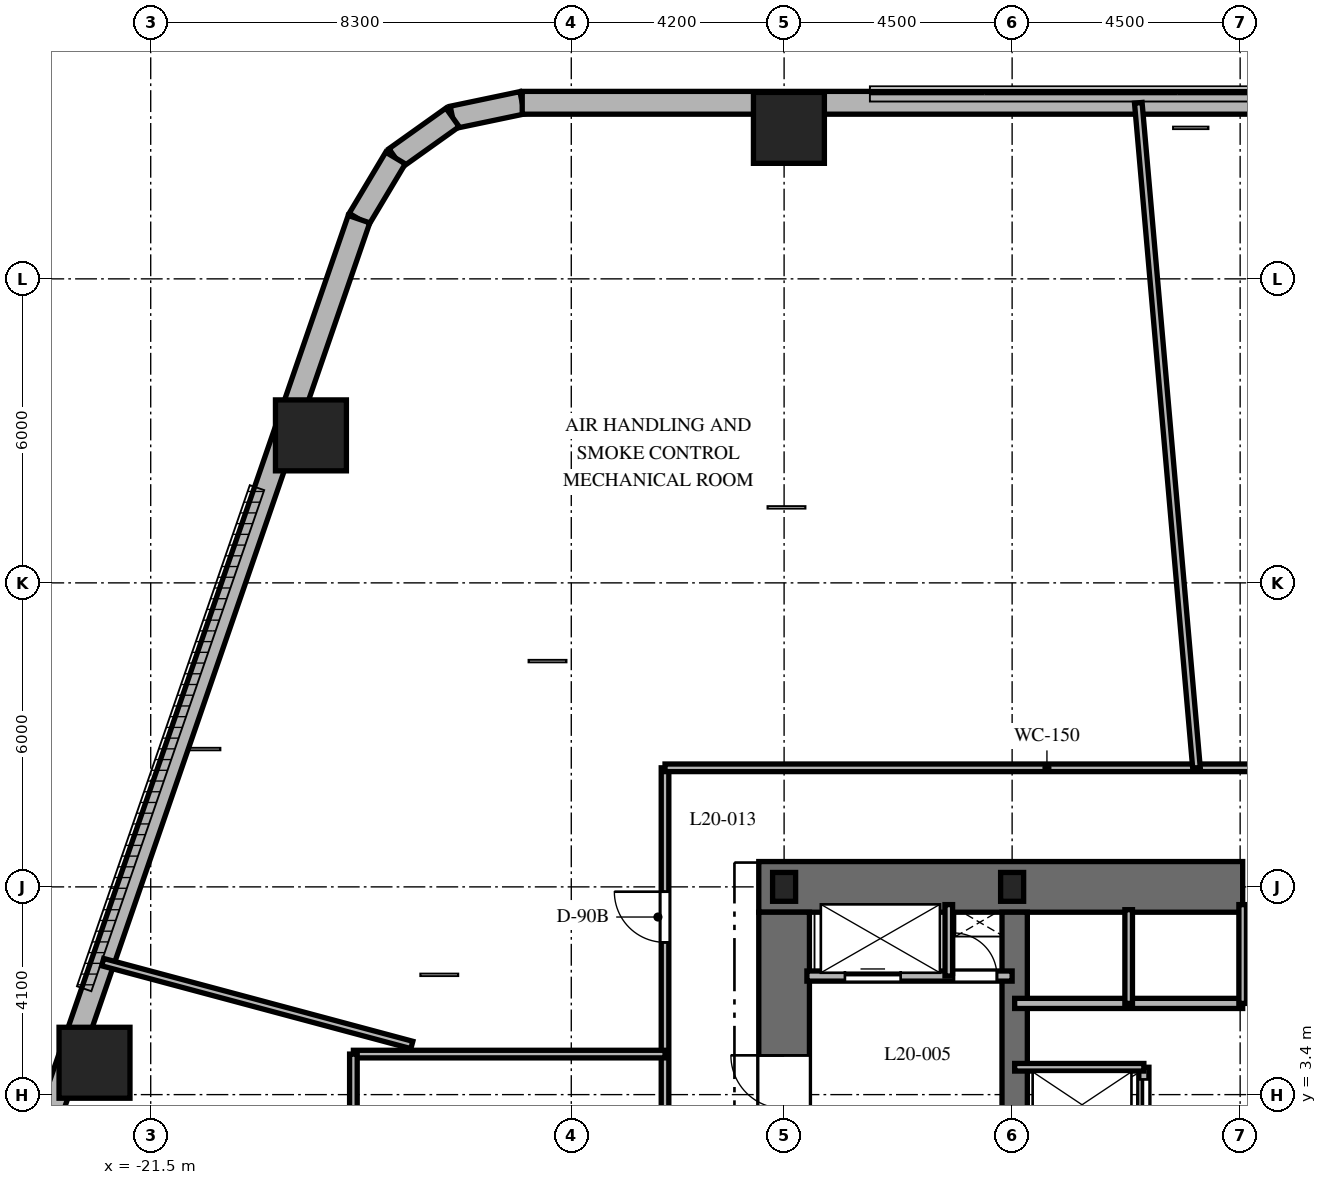
"""IFC4 building model, lengths in metres.
Left out: names, types, materials, properties, quantities, classifications, styles, units other than length and angle.
Written with IfcOpenShell. Run it as: python <this file> out.ifc"""

import sys

from ifc_helpers import new_model, si_unit, direction, frame, frame_2d, origin, origin_2d, place, context, subcontext, project, spatial, rectangle, i_section, extrude, element, fill, save


model = new_model("IFC4")
c1 = context("Model", 3, precision=1e-05, world=origin(), true_north=direction((0.0, 1.0)))
c2 = subcontext(c1, "Body", "Model", "MODEL_VIEW")
j1 = project(units=[si_unit("LENGTHUNIT", "METRE"), si_unit("PLANEANGLEUNIT", "RADIAN")], contexts=[c1])
p1 = place(None, origin())
s1 = spatial("IfcSite", under=j1, at=p1, CompositionType="ELEMENT")
p2 = place(p1, origin())
s2 = spatial("IfcBuilding", under=s1, at=p2, CompositionType="ELEMENT")
p3 = place(p2, frame((0.0, 0.0, 86.0)))
s3 = spatial("IfcBuildingStorey", under=s2, at=p3, CompositionType="ELEMENT", Elevation=86.0)
p4 = place(p3, frame((-9.5, 7.5, 0.0), z_axis=(0.0, 0.0, 1.0), x_axis=(1.0, 0.0, 0.0)))
e1 = element("IfcWall", 1, at=p4, inside=s3, PredefinedType="SHEAR", context=c2, shape_type="SweptSolid", body=[
    extrude(rectangle(XDim=9.55, YDim=1.0, at=frame_2d((4.775, 0.0))), origin(), (0.0, 0.0, 1.0), 5.4),
])
p5 = place(p3, frame((-9.0, -7.0, 0.0), z_axis=(0.0, 0.0, 1.0), x_axis=(0.0, 1.0, 0.0)))
e2 = element("IfcWall", 2, at=p5, inside=s3, PredefinedType="SHEAR", context=c2, shape_type="SweptSolid", body=[
    extrude(rectangle(XDim=14.0, YDim=1.0, at=frame_2d((7.0, 0.0))), origin(), (0.0, 0.0, 1.0), 5.4),
])
p6 = place(p5, frame((10.125, 0.0, 0.0)))
e3 = element("IfcOpeningElement", 3, at=p6, cuts=e2, PredefinedType="OPENING", context=c2, shape_type="SweptSolid", body=[
    extrude(rectangle(XDim=1.05, YDim=2.15, at=frame_2d((0.525, 1.075))), frame((0.0, 0.51, 0.0), z_axis=(0.0, -1.0, 0.0), x_axis=(1.0, 0.0, 0.0)), (0.0, 0.0, 1.0), 1.02),
])
p7 = place(p3, frame((-4.45, 2.25, 0.0), z_axis=(0.0, 0.0, 1.0), x_axis=(0.0, 1.0, 0.0)))
e4 = element("IfcWall", 4, at=p7, inside=s3, PredefinedType="SHEAR", context=c2, shape_type="SweptSolid", body=[
    extrude(rectangle(XDim=4.75, YDim=0.5, at=frame_2d((2.375, 0.0))), origin(), (0.0, 0.0, 1.0), 5.4),
])
for number, where, z_axis, x_axis in (
    (5, (-4.5, 7.5, 0.0), (0.0, 0.0, 1.0), (1.0, 0.0, 0.0)),
    (6, (-9.0, 7.5, 0.0), (0.0, 0.0, 1.0), (1.0, 0.0, 0.0)),
):
    element("IfcColumn", number, at=place(p3, frame(where, z_axis=z_axis, x_axis=x_axis)), inside=s3, PredefinedType="COLUMN", context=c2, shape_type="SweptSolid", body=[
        extrude(i_section(OverallWidth=0.454, OverallDepth=0.569, WebThickness=0.078, FlangeThickness=0.125, at=origin_2d()), origin(), (0.0, 0.0, 1.0), 5.4),
    ])
for number, where, z_axis, x_axis in (
    (7, (-8.905, 22.48, 0.0), (0.0, 0.0, 1.0), (1.0, 0.0, 0.0)),
    (8, (-18.338, 16.411, 0.0), (0.0, 0.0, 1.0), (1.0, 0.0, 0.0)),
    (9, (-22.609, 4.029, 0.0), (0.0, 0.0, 1.0), (1.0, 0.0, 0.0)),
):
    element("IfcColumn", number, at=place(p3, frame(where, z_axis=z_axis, x_axis=x_axis)), inside=s3, PredefinedType="COLUMN", context=c2, shape_type="SweptSolid", body=[
        extrude(rectangle(XDim=1.4, YDim=1.4, at=origin_2d()), origin(), (0.0, 0.0, 1.0), 5.4),
    ])
p8 = place(p3, frame((-14.168, 22.975, 0.0), z_axis=(0.0, 0.0, 1.0), x_axis=(-0.978770371074, -0.204959900243, 0.0)))
e10 = element("IfcWall", 10, at=p8, inside=s3, PredefinedType="SOLIDWALL", context=c2, shape_type="SweptSolid", body=[
    extrude(rectangle(XDim=1.406, YDim=0.45, at=frame_2d((0.703, 0.0))), origin(), (0.0, 0.0, 1.0), 5.1),
])
p9 = place(p3, frame((-15.544, 22.687, 0.0), z_axis=(0.0, 0.0, 1.0), x_axis=(-0.814210854316, -0.580569276412, 0.0)))
e11 = element("IfcWall", 11, at=p9, inside=s3, PredefinedType="SOLIDWALL", context=c2, shape_type="SweptSolid", body=[
    extrude(rectangle(XDim=1.381, YDim=0.45, at=frame_2d((0.691, 0.0))), origin(), (0.0, 0.0, 1.0), 5.1),
])
p10 = place(p3, frame((-16.669, 21.885, 0.0), z_axis=(0.0, 0.0, 1.0), x_axis=(-0.512936712947, -0.858426425799, 0.0)))
e12 = element("IfcWall", 12, at=p10, inside=s3, PredefinedType="SOLIDWALL", context=c2, shape_type="SweptSolid", body=[
    extrude(rectangle(XDim=1.406, YDim=0.45, at=frame_2d((0.703, 0.0))), origin(), (0.0, 0.0, 1.0), 5.1),
])
p11 = place(p3, frame((12.221, 22.975, 0.0), z_axis=(0.0, 0.0, 1.0), x_axis=(-1.0, 0.0, 0.0)))
e13 = element("IfcWall", 13, at=p11, inside=s3, PredefinedType="SOLIDWALL", context=c2, shape_type="SweptSolid", body=[
    extrude(rectangle(XDim=26.389, YDim=0.45, at=frame_2d((13.195, 0.0))), origin(), (0.0, 0.0, 1.0), 5.1),
])
p12 = place(p3, frame((-17.39, 20.678, 0.0), z_axis=(0.0, 0.0, 1.0), x_axis=(-0.326068018294, -0.945346310854, 0.0)))
e14 = element("IfcWall", 14, at=p12, inside=s3, PredefinedType="SOLIDWALL", context=c2, shape_type="SweptSolid", body=[
    extrude(rectangle(XDim=21.793, YDim=0.45, at=frame_2d((10.896, 0.0))), origin(), (0.0, 0.0, 1.0), 5.1),
])
p13 = place(p3, frame((-8.55, 5.74, 0.0), z_axis=(0.0, 0.0, 1.0), x_axis=(1.0, 0.0, 0.0)))
e15 = element("IfcWall", 15, at=p13, inside=s3, PredefinedType="PARTITIONING", context=c2, shape_type="SweptSolid", body=[
    extrude(rectangle(XDim=4.05, YDim=0.2, at=frame_2d((2.025, 0.0))), origin(), (0.0, 0.0, 1.0), 5.1),
])
p14 = place(p13, frame((0.75, 0.0, 0.0)))
e16 = element("IfcOpeningElement", 16, at=p14, cuts=e15, PredefinedType="OPENING", context=c2, shape_type="SweptSolid", body=[
    extrude(rectangle(XDim=1.1, YDim=2.2, at=frame_2d((0.55, 1.1))), frame((0.0, 0.11, 0.0), z_axis=(0.0, -1.0, 0.0), x_axis=(1.0, 0.0, 0.0)), (0.0, 0.0, 1.0), 0.22),
])
p15 = place(p13, frame((2.9, 0.0, 0.0)))
e17 = element("IfcOpeningElement", 17, at=p15, cuts=e15, PredefinedType="OPENING", context=c2, shape_type="SweptSolid", body=[
    extrude(rectangle(XDim=0.85, YDim=2.03, at=frame_2d((0.425, 1.015))), frame((0.0, 0.11, 0.0), z_axis=(0.0, -1.0, 0.0), x_axis=(1.0, 0.0, 0.0)), (0.0, 0.0, 1.0), 0.22),
])
p16 = place(p3, frame((-5.75, 5.74, 0.0), z_axis=(0.0, 0.0, 1.0), x_axis=(0.0, 1.0, 0.0)))
e18 = element("IfcWall", 18, at=p16, inside=s3, PredefinedType="PARTITIONING", context=c2, shape_type="SweptSolid", body=[
    extrude(rectangle(XDim=1.41, YDim=0.15, at=frame_2d((0.705, 0.0))), origin(), (0.0, 0.0, 1.0), 5.1),
])
p17 = place(p3, frame((-4.45, 5.2, 0.0), z_axis=(0.0, 0.0, 1.0), x_axis=(1.0, 0.0, 0.0)))
e19 = element("IfcWall", 19, at=p17, inside=s3, PredefinedType="PARTITIONING", context=c2, shape_type="SweptSolid", body=[
    extrude(rectangle(XDim=4.5, YDim=0.2, at=frame_2d((2.25, 0.0))), origin(), (0.0, 0.0, 1.0), 5.1),
])
p18 = place(p3, frame((-2.2, 5.2, 0.0), z_axis=(0.0, 0.0, 1.0), x_axis=(0.0, 1.0, 0.0)))
e20 = element("IfcWall", 20, at=p18, inside=s3, PredefinedType="PARTITIONING", context=c2, shape_type="SweptSolid", body=[
    extrude(rectangle(XDim=1.85, YDim=0.15, at=frame_2d((0.925, 0.0))), origin(), (0.0, 0.0, 1.0), 5.1),
])
p19 = place(p3, frame((0.05, 5.2, 0.0), z_axis=(0.0, 0.0, 1.0), x_axis=(0.0, 1.0, 0.0)))
e21 = element("IfcWall", 21, at=p19, inside=s3, PredefinedType="PARTITIONING", context=c2, shape_type="SweptSolid", body=[
    extrude(rectangle(XDim=1.95, YDim=0.15, at=frame_2d((0.975, 0.0))), origin(), (0.0, 0.0, 1.0), 5.1),
])
p20 = place(p3, frame((-1.9, -0.5, 0.0), z_axis=(0.0, 0.0, 1.0), x_axis=(0.0, 1.0, 0.0)))
e22 = element("IfcWall", 22, at=p20, inside=s3, PredefinedType="PARTITIONING", context=c2, shape_type="SweptSolid", body=[
    extrude(rectangle(XDim=4.44, YDim=0.2, at=frame_2d((2.22, 0.0))), origin(), (0.0, 0.0, 1.0), 5.1),
])
p21 = place(p20, frame((0.24, 0.0, 0.0)))
e23 = element("IfcOpeningElement", 23, at=p21, cuts=e22, PredefinedType="OPENING", context=c2, shape_type="SweptSolid", body=[
    extrude(rectangle(XDim=1.0, YDim=2.2, at=frame_2d((0.5, 1.1))), frame((0.0, 0.11, 0.0), z_axis=(0.0, -1.0, 0.0), x_axis=(1.0, 0.0, 0.0)), (0.0, 0.0, 1.0), 0.22),
])
p22 = place(p20, frame((1.72, 0.0, 0.0)))
e24 = element("IfcOpeningElement", 24, at=p22, cuts=e22, PredefinedType="OPENING", context=c2, shape_type="SweptSolid", body=[
    extrude(rectangle(XDim=1.0, YDim=2.2, at=frame_2d((0.5, 1.1))), frame((0.0, 0.11, 0.0), z_axis=(0.0, -1.0, 0.0), x_axis=(1.0, 0.0, 0.0)), (0.0, 0.0, 1.0), 0.22),
])
p23 = place(p20, frame((3.2, 0.0, 0.0)))
e25 = element("IfcOpeningElement", 25, at=p23, cuts=e22, PredefinedType="OPENING", context=c2, shape_type="SweptSolid", body=[
    extrude(rectangle(XDim=1.0, YDim=2.2, at=frame_2d((0.5, 1.1))), frame((0.0, 0.11, 0.0), z_axis=(0.0, -1.0, 0.0), x_axis=(1.0, 0.0, 0.0)), (0.0, 0.0, 1.0), 0.22),
])
p24 = place(p3, frame((-4.45, 3.94, 0.0), z_axis=(0.0, 0.0, 1.0), x_axis=(1.0, 0.0, 0.0)))
e26 = element("IfcWall", 26, at=p24, inside=s3, PredefinedType="PARTITIONING", context=c2, shape_type="SweptSolid", body=[
    extrude(rectangle(XDim=2.55, YDim=0.15, at=frame_2d((1.275, 0.0))), origin(), (0.0, 0.0, 1.0), 5.1),
])
p25 = place(p3, frame((-11.35, -9.85, 0.0), z_axis=(0.0, 0.0, 1.0), x_axis=(0.0, 1.0, 0.0)))
e27 = element("IfcWall", 27, at=p25, inside=s3, PredefinedType="PARTITIONING", context=c2, shape_type="SweptSolid", body=[
    extrude(rectangle(XDim=19.7, YDim=0.15, at=frame_2d((9.85, 0.0))), origin(), (0.0, 0.0, 1.0), 3.29),
])
p26 = place(p25, frame((10.825, 0.0, 0.0)))
e28 = element("IfcOpeningElement", 28, at=p26, cuts=e27, PredefinedType="OPENING", context=c2, shape_type="SweptSolid", body=[
    extrude(rectangle(XDim=1.05, YDim=2.15, at=frame_2d((0.525, 1.075))), frame((0.0, 0.085, 0.0), z_axis=(0.0, -1.0, 0.0), x_axis=(1.0, 0.0, 0.0)), (0.0, 0.0, 1.0), 0.17),
])
p27 = place(p25, frame((16.255, 0.0, 0.0)))
e29 = element("IfcOpeningElement", 29, at=p27, cuts=e27, PredefinedType="OPENING", context=c2, shape_type="SweptSolid", body=[
    extrude(rectangle(XDim=1.0, YDim=2.15, at=frame_2d((0.5, 1.075))), frame((0.0, 0.085, 0.0), z_axis=(0.0, -1.0, 0.0), x_axis=(1.0, 0.0, 0.0)), (0.0, 0.0, 1.0), 0.17),
])
p28 = place(p25, frame((3.945, 0.0, 0.0)))
e30 = element("IfcOpeningElement", 30, at=p28, cuts=e27, PredefinedType="OPENING", context=c2, shape_type="SweptSolid", body=[
    extrude(rectangle(XDim=1.0, YDim=2.15, at=frame_2d((0.5, 1.075))), frame((0.0, 0.085, 0.0), z_axis=(0.0, -1.0, 0.0), x_axis=(1.0, 0.0, 0.0)), (0.0, 0.0, 1.0), 0.17),
])
p29 = place(p3, frame((-11.35, 9.85, 0.0), z_axis=(0.0, 0.0, 1.0), x_axis=(1.0, 0.0, 0.0)))
e31 = element("IfcWall", 31, at=p29, inside=s3, PredefinedType="PARTITIONING", context=c2, shape_type="SweptSolid", body=[
    extrude(rectangle(XDim=22.7, YDim=0.15, at=frame_2d((11.35, 0.0))), origin(), (0.0, 0.0, 1.0), 3.29),
])
p30 = place(p29, frame((15.974, 0.0, 0.0)))
e32 = element("IfcOpeningElement", 32, at=p30, cuts=e31, PredefinedType="OPENING", context=c2, shape_type="SweptSolid", body=[
    extrude(rectangle(XDim=1.0, YDim=2.15, at=frame_2d((0.5, 1.075))), frame((0.0, 0.085, 0.0), z_axis=(0.0, -1.0, 0.0), x_axis=(1.0, 0.0, 0.0)), (0.0, 0.0, 1.0), 0.17),
])
p31 = place(p3, frame((-17.5, 4.2, 0.0), z_axis=(0.0, 0.0, 1.0), x_axis=(1.0, 0.0, 0.0)))
e33 = element("IfcWall", 33, at=p31, inside=s3, PredefinedType="PARTITIONING", context=c2, shape_type="SweptSolid", body=[
    extrude(rectangle(XDim=6.15, YDim=0.15, at=frame_2d((3.075, 0.0))), origin(), (0.0, 0.0, 1.0), 4.626),
])
p32 = place(p3, frame((-17.5, -1.2, 0.0), z_axis=(0.0, 0.0, 1.0), x_axis=(0.0, 1.0, 0.0)))
e34 = element("IfcWall", 34, at=p32, inside=s3, PredefinedType="PARTITIONING", context=c2, shape_type="SweptSolid", body=[
    extrude(rectangle(XDim=5.4, YDim=0.15, at=frame_2d((2.7, 0.0))), origin(), (0.0, 0.0, 1.0), 5.1),
])
p33 = place(p3, frame((-0.862, 9.85, 0.0), z_axis=(0.0, 0.0, 1.0), x_axis=(-0.087148560643, 0.996195326418, 0.0)))
e35 = element("IfcWall", 35, at=p33, inside=s3, PredefinedType="PARTITIONING", context=c2, shape_type="SweptSolid", body=[
    extrude(rectangle(XDim=13.175, YDim=0.15, at=frame_2d((6.587, 0.0))), origin(), (0.0, 0.0, 1.0), 3.29),
])
p34 = place(p3, frame((-16.346, 4.38, 0.0), z_axis=(0.0, 0.0, 1.0), x_axis=(-0.965923723189, 0.258826893852, 0.0)))
e36 = element("IfcWall", 36, at=p34, inside=s3, PredefinedType="PARTITIONING", context=c2, shape_type="SweptSolid", body=[
    extrude(rectangle(XDim=6.316, YDim=0.15, at=frame_2d((3.158, 0.0))), origin(), (0.0, 0.0, 1.0), 3.29),
])
p35 = place(p6, origin())
e37 = element("IfcDoor", 37, at=p35, inside=s3, OperationType="SINGLE_SWING_RIGHT", PredefinedType="DOOR", context=c2, shape_type="SweptSolid", body=[
    extrude(rectangle(XDim=1.05, YDim=2.15, at=frame_2d((0.525, 1.075))), frame((0.0, 0.025, 0.0), z_axis=(0.0, -1.0, 0.0), x_axis=(1.0, 0.0, 0.0)), (0.0, 0.0, 1.0), 0.05),
])
fill(e3, e37)
p36 = place(p14, origin())
e38 = element("IfcDoor", 38, at=p36, inside=s3, OperationType="SLIDING_TO_LEFT", PredefinedType="DOOR", context=c2, shape_type="SweptSolid", body=[
    extrude(rectangle(XDim=1.1, YDim=2.2, at=frame_2d((0.55, 1.1))), frame((0.0, 0.025, 0.0), z_axis=(0.0, -1.0, 0.0), x_axis=(1.0, 0.0, 0.0)), (0.0, 0.0, 1.0), 0.05),
])
fill(e16, e38)
p37 = place(p15, origin())
e39 = element("IfcDoor", 39, at=p37, inside=s3, OperationType="SINGLE_SWING_LEFT", PredefinedType="DOOR", context=c2, shape_type="SweptSolid", body=[
    extrude(rectangle(XDim=0.85, YDim=2.03, at=frame_2d((0.425, 1.015))), frame((0.0, 0.025, 0.0), z_axis=(0.0, -1.0, 0.0), x_axis=(1.0, 0.0, 0.0)), (0.0, 0.0, 1.0), 0.05),
])
fill(e17, e39)
p38 = place(p23, origin())
e40 = element("IfcDoor", 40, at=p38, inside=s3, OperationType="SLIDING_TO_LEFT", PredefinedType="DOOR", context=c2, shape_type="SweptSolid", body=[
    extrude(rectangle(XDim=1.0, YDim=2.2, at=frame_2d((0.5, 1.1))), frame((0.0, 0.025, 0.0), z_axis=(0.0, -1.0, 0.0), x_axis=(1.0, 0.0, 0.0)), (0.0, 0.0, 1.0), 0.05),
])
fill(e25, e40)
p39 = place(p27, origin())
e41 = element("IfcDoor", 41, at=p39, inside=s3, OperationType="SINGLE_SWING_RIGHT", PredefinedType="DOOR", context=c2, shape_type="SweptSolid", body=[
    extrude(rectangle(XDim=1.0, YDim=2.15, at=frame_2d((0.5, 1.075))), frame((0.0, 0.025, 0.0), z_axis=(0.0, -1.0, 0.0), x_axis=(1.0, 0.0, 0.0)), (0.0, 0.0, 1.0), 0.05),
])
fill(e29, e41)
save(model, sys.argv[1])
